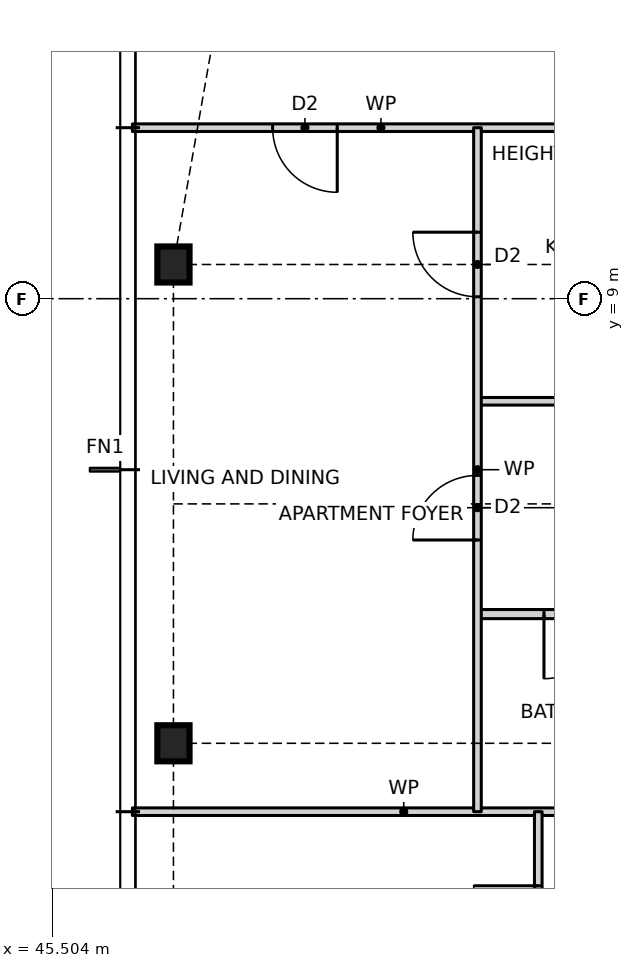
"""IFC4 building model, lengths in metres.
Left out: names, types, materials, properties, quantities, classifications, styles, units other than length and angle.
Written with IfcOpenShell. Run it as: python <this file> out.ifc"""

import sys

from ifc_helpers import new_model, si_unit, direction, frame, frame_2d, origin, origin_2d, place, context, subcontext, project, spatial, rectangle, i_section, extrude, element, fill, save


model = new_model("IFC4")
c1 = context("Model", 3, precision=1e-05, world=origin(), true_north=direction((0.0, 1.0)))
c2 = subcontext(c1, "Body", "Model", "MODEL_VIEW")
j1 = project(units=[si_unit("LENGTHUNIT", "METRE"), si_unit("PLANEANGLEUNIT", "RADIAN")], contexts=[c1])
p1 = place(None, origin())
s1 = spatial("IfcSite", under=j1, at=p1, CompositionType="ELEMENT")
p2 = place(p1, origin())
s2 = spatial("IfcBuilding", under=s1, at=p2, CompositionType="ELEMENT")
p3 = place(p2, frame((0.0, 0.0, 50.0)))
s3 = spatial("IfcBuildingStorey", under=s2, at=p3, CompositionType="ELEMENT", Elevation=50.0)
for number, where, z_axis, x_axis in (
    (1, (47.1, 9.45, 0.0), (0.0, 0.0, 1.0), (1.0, 0.0, 0.0)),
    (2, (47.1, 3.15, 0.0), (0.0, 0.0, 1.0), (1.0, 0.0, 0.0)),
):
    element("IfcColumn", number, at=place(p3, frame(where, z_axis=z_axis, x_axis=x_axis)), inside=s3, PredefinedType="COLUMN", context=c2, shape_type="SweptSolid", body=[
        extrude(i_section(OverallWidth=0.424, OverallDepth=0.475, WebThickness=0.048, FlangeThickness=0.077, at=origin_2d()), origin(), (0.0, 0.0, 1.0), 3.5),
    ])
p4 = place(p3, frame((46.56, 2.25, 0.0), z_axis=(0.0, 0.0, 1.0), x_axis=(1.0, 0.0, 0.0)))
e3 = element("IfcWall", 3, at=p4, inside=s3, PredefinedType="PARTITIONING", context=c2, shape_type="SweptSolid", body=[
    extrude(rectangle(XDim=7.14, YDim=0.1, at=frame_2d((3.57, 0.0))), origin(), (0.0, 0.0, 1.0), 3.27),
])
p5 = place(p3, frame((51.1, 4.85, 0.0), z_axis=(0.0, 0.0, 1.0), x_axis=(1.0, 0.0, 0.0)))
e4 = element("IfcWall", 4, at=p5, inside=s3, PredefinedType="PARTITIONING", context=c2, shape_type="SweptSolid", body=[
    extrude(rectangle(XDim=2.6, YDim=0.12, at=frame_2d((1.3, 0.0))), origin(), (0.0, 0.0, 1.0), 3.27),
])
p6 = place(p5, frame((0.875, 0.0, 0.0)))
e5 = element("IfcOpeningElement", 5, at=p6, cuts=e4, PredefinedType="OPENING", context=c2, shape_type="SweptSolid", body=[
    extrude(rectangle(XDim=0.85, YDim=2.1, at=frame_2d((0.425, 1.05))), frame((0.0, 0.07, 0.0), z_axis=(0.0, -1.0, 0.0), x_axis=(1.0, 0.0, 0.0)), (0.0, 0.0, 1.0), 0.14),
])
p7 = place(p3, frame((51.1, 7.65, 0.0), z_axis=(0.0, 0.0, 1.0), x_axis=(1.0, 0.0, 0.0)))
e6 = element("IfcWall", 6, at=p7, inside=s3, PredefinedType="PARTITIONING", context=c2, shape_type="SweptSolid", body=[
    extrude(rectangle(XDim=2.6, YDim=0.1, at=frame_2d((1.3, 0.0))), origin(), (0.0, 0.0, 1.0), 3.27),
])
p8 = place(p3, frame((46.56, 11.25, 0.0), z_axis=(0.0, 0.0, 1.0), x_axis=(1.0, 0.0, 0.0)))
e7 = element("IfcWall", 7, at=p8, inside=s3, PredefinedType="PARTITIONING", context=c2, shape_type="SweptSolid", body=[
    extrude(rectangle(XDim=6.54, YDim=0.1, at=frame_2d((3.27, 0.0))), origin(), (0.0, 0.0, 1.0), 3.27),
])
p9 = place(p8, frame((1.845, 0.0, 0.0)))
e8 = element("IfcOpeningElement", 8, at=p9, cuts=e7, PredefinedType="OPENING", context=c2, shape_type="SweptSolid", body=[
    extrude(rectangle(XDim=0.85, YDim=2.1, at=frame_2d((0.425, 1.05))), frame((0.0, 0.06, 0.0), z_axis=(0.0, -1.0, 0.0), x_axis=(1.0, 0.0, 0.0)), (0.0, 0.0, 1.0), 0.12),
])
p10 = place(p3, frame((51.9, -0.55, 0.0), z_axis=(0.0, 0.0, 1.0), x_axis=(0.0, 1.0, 0.0)))
e9 = element("IfcWall", 9, at=p10, inside=s3, PredefinedType="PARTITIONING", context=c2, shape_type="SweptSolid", body=[
    extrude(rectangle(XDim=2.8, YDim=0.1, at=frame_2d((1.4, 0.0))), origin(), (0.0, 0.0, 1.0), 3.27),
])
p11 = place(p10, frame((0.975, 0.0, 0.0)))
e10 = element("IfcOpeningElement", 10, at=p11, cuts=e9, PredefinedType="OPENING", context=c2, shape_type="SweptSolid", body=[
    extrude(rectangle(XDim=0.85, YDim=2.1, at=frame_2d((0.425, 1.05))), frame((0.0, 0.06, 0.0), z_axis=(0.0, -1.0, 0.0), x_axis=(1.0, 0.0, 0.0)), (0.0, 0.0, 1.0), 0.12),
])
p12 = place(p3, frame((51.1, 2.25, 0.0), z_axis=(0.0, 0.0, 1.0), x_axis=(0.0, 1.0, 0.0)))
e11 = element("IfcWall", 11, at=p12, inside=s3, PredefinedType="PARTITIONING", context=c2, shape_type="SweptSolid", body=[
    extrude(rectangle(XDim=9.0, YDim=0.1, at=frame_2d((4.5, 0.0))), origin(), (0.0, 0.0, 1.0), 3.27),
])
p13 = place(p12, frame((6.775, 0.0, 0.0)))
e12 = element("IfcOpeningElement", 12, at=p13, cuts=e11, PredefinedType="OPENING", context=c2, shape_type="SweptSolid", body=[
    extrude(rectangle(XDim=0.85, YDim=2.1, at=frame_2d((0.425, 1.05))), frame((0.0, 0.06, 0.0), z_axis=(0.0, -1.0, 0.0), x_axis=(1.0, 0.0, 0.0)), (0.0, 0.0, 1.0), 0.12),
])
p14 = place(p12, frame((3.575, 0.0, 0.0)))
e13 = element("IfcOpeningElement", 13, at=p14, cuts=e11, PredefinedType="OPENING", context=c2, shape_type="SweptSolid", body=[
    extrude(rectangle(XDim=0.85, YDim=2.1, at=frame_2d((0.425, 1.05))), frame((0.0, 0.06, 0.0), z_axis=(0.0, -1.0, 0.0), x_axis=(1.0, 0.0, 0.0)), (0.0, 0.0, 1.0), 0.12),
])
p15 = place(p3, frame((53.936, 10.3, 0.0), z_axis=(0.0, 0.0, 1.0), x_axis=(-0.660638210404, 0.750704439146, 0.0)))
e14 = element("IfcWall", 14, at=p15, inside=s3, PredefinedType="PARTITIONING", context=c2, shape_type="SweptSolid", body=[
    extrude(rectangle(XDim=9.07, YDim=0.1, at=frame_2d((4.535, 0.0))), origin(), (0.0, 0.0, 1.0), 2.429),
])
p16 = place(p13, origin())
e15 = element("IfcDoor", 15, at=p16, inside=s3, OperationType="SINGLE_SWING_RIGHT", PredefinedType="DOOR", context=c2, shape_type="SweptSolid", body=[
    extrude(rectangle(XDim=0.85, YDim=2.1, at=frame_2d((0.425, 1.05))), frame((0.0, 0.025, 0.0), z_axis=(0.0, -1.0, 0.0), x_axis=(1.0, 0.0, 0.0)), (0.0, 0.0, 1.0), 0.05),
])
fill(e12, e15)
p17 = place(p14, origin())
e16 = element("IfcDoor", 16, at=p17, inside=s3, OperationType="SINGLE_SWING_LEFT", PredefinedType="DOOR", context=c2, shape_type="SweptSolid", body=[
    extrude(rectangle(XDim=0.85, YDim=2.1, at=frame_2d((0.425, 1.05))), frame((0.0, 0.025, 0.0), z_axis=(0.0, -1.0, 0.0), x_axis=(1.0, 0.0, 0.0)), (0.0, 0.0, 1.0), 0.05),
])
fill(e13, e16)
p18 = place(p6, frame((0.85, 0.0, 0.0), z_axis=(0.0, 0.0, 1.0), x_axis=(-1.0, 0.0, 0.0)))
e17 = element("IfcDoor", 17, at=p18, inside=s3, OperationType="SINGLE_SWING_RIGHT", PredefinedType="DOOR", context=c2, shape_type="SweptSolid", body=[
    extrude(rectangle(XDim=0.85, YDim=2.1, at=frame_2d((0.425, 1.05))), frame((0.0, 0.025, 0.0), z_axis=(0.0, -1.0, 0.0), x_axis=(1.0, 0.0, 0.0)), (0.0, 0.0, 1.0), 0.05),
])
fill(e5, e17)
p19 = place(p9, frame((0.85, 0.0, 0.0), z_axis=(0.0, 0.0, 1.0), x_axis=(-1.0, 0.0, 0.0)))
e18 = element("IfcDoor", 18, at=p19, inside=s3, OperationType="SINGLE_SWING_LEFT", PredefinedType="DOOR", context=c2, shape_type="SweptSolid", body=[
    extrude(rectangle(XDim=0.85, YDim=2.1, at=frame_2d((0.425, 1.05))), frame((0.0, 0.025, 0.0), z_axis=(0.0, -1.0, 0.0), x_axis=(1.0, 0.0, 0.0)), (0.0, 0.0, 1.0), 0.05),
])
fill(e8, e18)
p20 = place(p11, origin())
e19 = element("IfcDoor", 19, at=p20, inside=s3, OperationType="SINGLE_SWING_RIGHT", PredefinedType="DOOR", context=c2, shape_type="SweptSolid", body=[
    extrude(rectangle(XDim=0.85, YDim=2.1, at=frame_2d((0.425, 1.05))), frame((0.0, 0.025, 0.0), z_axis=(0.0, -1.0, 0.0), x_axis=(1.0, 0.0, 0.0)), (0.0, 0.0, 1.0), 0.05),
])
fill(e10, e19)
save(model, sys.argv[1])
